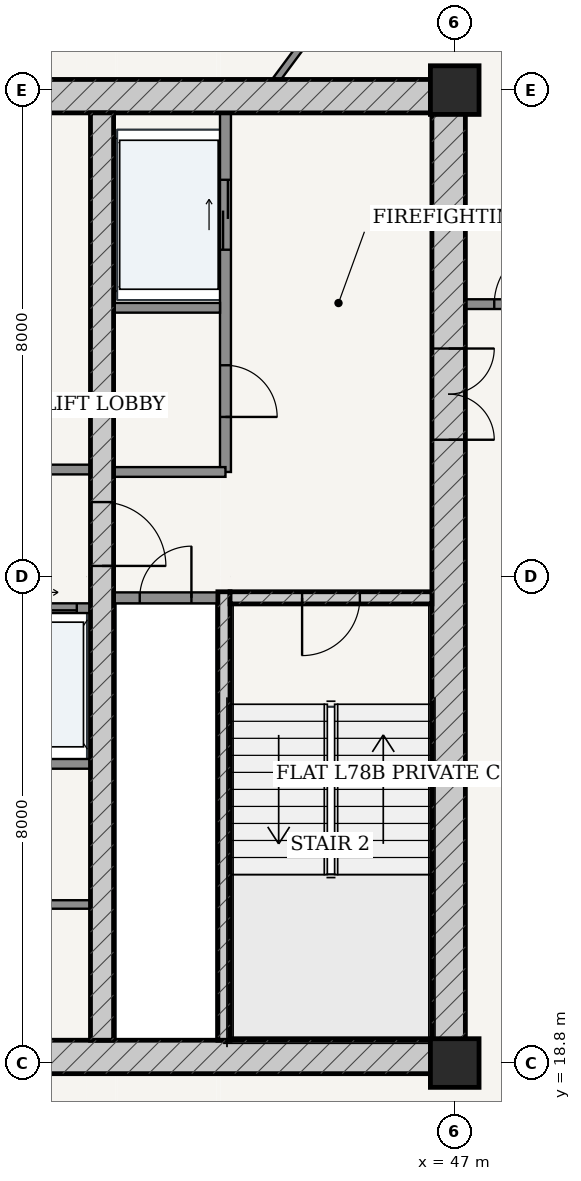
"""IFC4 building model, lengths in metres.
Left out: names, types, materials, properties, quantities, classifications, styles, units other than length and angle.
Written with IfcOpenShell. Run it as: python <this file> out.ifc"""

import sys

from ifc_helpers import new_model, si_unit, direction, frame, frame_2d, origin, origin_2d, place, context, subcontext, project, spatial, rectangle, extrude, source, transform, mapped, element, fill, save


model = new_model("IFC4")
c1 = context("Model", 3, precision=1e-05, world=origin(), true_north=direction((-0.2419218956, 0.970295726276)))
c2 = subcontext(c1, "Body", "Model", "MODEL_VIEW")
j1 = project(units=[si_unit("LENGTHUNIT", "METRE"), si_unit("PLANEANGLEUNIT", "RADIAN")], contexts=[c1])
p1 = place(None, origin())
s1 = spatial("IfcSite", under=j1, at=p1, CompositionType="ELEMENT")
p2 = place(p1, origin())
s2 = spatial("IfcBuilding", under=s1, at=p2, CompositionType="ELEMENT")
p3 = place(p2, frame((0.0, 0.0, 296.95)))
s3 = spatial("IfcBuildingStorey", under=s2, at=p3, CompositionType="ELEMENT", Elevation=296.95)
for number, where, z_axis, x_axis in (
    (1, (47.0, 18.8, 0.0), (0.0, 0.0, 1.0), (1.0, 0.0, 0.0)),
    (2, (47.0, 34.8, 0.0), (0.0, 0.0, 1.0), (1.0, 0.0, 0.0)),
):
    element("IfcColumn", number, at=place(p3, frame(where, z_axis=z_axis, x_axis=x_axis)), inside=s3, PredefinedType="COLUMN", context=c2, shape_type="SweptSolid", body=[
        extrude(rectangle(XDim=0.8, YDim=0.8, at=origin_2d()), origin(), (0.0, 0.0, 1.0), 3.75),
    ])
p4 = place(p3, frame((28.825, 18.9, 0.0), z_axis=(0.0, 0.0, 1.0), x_axis=(1.0, 0.0, 0.0)))
e3 = element("IfcWall", 3, at=p4, inside=s3, PredefinedType="SHEAR", context=c2, shape_type="SweptSolid", body=[
    extrude(rectangle(XDim=18.35, YDim=0.55, at=frame_2d((9.175, 0.0))), origin(), (0.0, 0.0, 1.0), 3.3),
])
p5 = place(p4, frame((8.75, 0.0, 0.0)))
e4 = element("IfcOpeningElement", 4, at=p5, cuts=e3, PredefinedType="OPENING", context=c2, shape_type="SweptSolid", body=[
    extrude(rectangle(XDim=0.85, YDim=2.1, at=frame_2d((0.425, 1.05))), frame((0.0, 0.285, 0.0), z_axis=(0.0, -1.0, 0.0), x_axis=(1.0, 0.0, 0.0)), (0.0, 0.0, 1.0), 0.57),
])
p6 = place(p3, frame((28.825, 34.7, 0.0), z_axis=(0.0, 0.0, 1.0), x_axis=(1.0, 0.0, 0.0)))
e5 = element("IfcWall", 5, at=p6, inside=s3, PredefinedType="SHEAR", context=c2, shape_type="SweptSolid", body=[
    extrude(rectangle(XDim=18.35, YDim=0.55, at=frame_2d((9.175, 0.0))), origin(), (0.0, 0.0, 1.0), 3.3),
])
p7 = place(p3, frame((46.9, 19.175, 0.0), z_axis=(0.0, 0.0, 1.0), x_axis=(0.0, 1.0, 0.0)))
e6 = element("IfcWall", 6, at=p7, inside=s3, PredefinedType="SHEAR", context=c2, shape_type="SweptSolid", body=[
    extrude(rectangle(XDim=15.25, YDim=0.55, at=frame_2d((7.625, 0.0))), origin(), (0.0, 0.0, 1.0), 3.3),
])
p8 = place(p7, frame((9.875, 0.0, 0.0)))
e7 = element("IfcOpeningElement", 7, at=p8, cuts=e6, PredefinedType="OPENING", context=c2, shape_type="SweptSolid", body=[
    extrude(rectangle(XDim=1.5, YDim=2.2, at=frame_2d((0.75, 1.1))), frame((0.0, 0.285, 0.0), z_axis=(0.0, -1.0, 0.0), x_axis=(1.0, 0.0, 0.0)), (0.0, 0.0, 1.0), 0.57),
])
p9 = place(p3, frame((43.205, 19.175, 0.0), z_axis=(0.0, 0.0, 1.0), x_axis=(0.0, 1.0, 0.0)))
e8 = element("IfcWall", 8, at=p9, inside=s3, PredefinedType="SOLIDWALL", context=c2, shape_type="SweptSolid", body=[
    extrude(rectangle(XDim=7.375, YDim=0.2, at=frame_2d((3.688, 0.0))), origin(), (0.0, 0.0, 1.0), 3.3),
])
p10 = place(p3, frame((43.305, 26.45, 0.0), z_axis=(0.0, 0.0, 1.0), x_axis=(1.0, 0.0, 0.0)))
e9 = element("IfcWall", 9, at=p10, inside=s3, PredefinedType="SOLIDWALL", context=c2, shape_type="SweptSolid", body=[
    extrude(rectangle(XDim=3.32, YDim=0.2, at=frame_2d((1.66, 0.0))), origin(), (0.0, 0.0, 1.0), 3.3),
])
p11 = place(p10, frame((1.185, 0.0, 0.0)))
e10 = element("IfcOpeningElement", 10, at=p11, cuts=e9, PredefinedType="OPENING", context=c2, shape_type="SweptSolid", body=[
    extrude(rectangle(XDim=0.95, YDim=2.15, at=frame_2d((0.475, 1.075))), frame((0.0, 0.11, 0.0), z_axis=(0.0, -1.0, 0.0), x_axis=(1.0, 0.0, 0.0)), (0.0, 0.0, 1.0), 0.22),
])
p12 = place(p3, frame((41.2, 19.175, 0.0), z_axis=(0.0, 0.0, 1.0), x_axis=(0.0, 1.0, 0.0)))
e11 = element("IfcWall", 11, at=p12, inside=s3, PredefinedType="SHEAR", context=c2, shape_type="SweptSolid", body=[
    extrude(rectangle(XDim=15.25, YDim=0.38, at=frame_2d((7.625, 0.0))), origin(), (0.0, 0.0, 1.0), 3.3),
])
p13 = place(p12, frame((7.8, 0.0, 0.0)))
e12 = element("IfcOpeningElement", 12, at=p13, cuts=e11, PredefinedType="OPENING", context=c2, shape_type="SweptSolid", body=[
    extrude(rectangle(XDim=1.05, YDim=2.15, at=frame_2d((0.525, 1.075))), frame((0.0, 0.2, 0.0), z_axis=(0.0, -1.0, 0.0), x_axis=(1.0, 0.0, 0.0)), (0.0, 0.0, 1.0), 0.4),
])
p14 = place(p3, frame((41.39, 26.45, 0.0), z_axis=(0.0, 0.0, 1.0), x_axis=(1.0, 0.0, 0.0)))
e13 = element("IfcWall", 13, at=p14, inside=s3, PredefinedType="PARTITIONING", context=c2, shape_type="SweptSolid", body=[
    extrude(rectangle(XDim=1.71, YDim=0.18, at=frame_2d((0.855, 0.0))), origin(), (0.0, 0.0, 1.0), 3.3),
])
p15 = place(p14, frame((0.43, 0.0, 0.0)))
e14 = element("IfcOpeningElement", 14, at=p15, cuts=e13, PredefinedType="OPENING", context=c2, shape_type="SweptSolid", body=[
    extrude(rectangle(XDim=0.85, YDim=2.1, at=frame_2d((0.425, 1.05))), frame((0.0, 0.1, 0.0), z_axis=(0.0, -1.0, 0.0), x_axis=(1.0, 0.0, 0.0)), (0.0, 0.0, 1.0), 0.2),
])
p16 = place(p3, frame((43.23, 28.52, 0.0), z_axis=(0.0, 0.0, 1.0), x_axis=(0.0, 1.0, 0.0)))
e15 = element("IfcWall", 15, at=p16, inside=s3, PredefinedType="PARTITIONING", context=c2, shape_type="SweptSolid", body=[
    extrude(rectangle(XDim=5.905, YDim=0.18, at=frame_2d((2.953, 0.0))), origin(), (0.0, 0.0, 1.0), 3.3),
])
p17 = place(p16, frame((0.905, 0.0, 0.0)))
e16 = element("IfcOpeningElement", 16, at=p17, cuts=e15, PredefinedType="OPENING", context=c2, shape_type="SweptSolid", body=[
    extrude(rectangle(XDim=0.85, YDim=2.1, at=frame_2d((0.425, 1.05))), frame((0.0, 0.1, 0.0), z_axis=(0.0, -1.0, 0.0), x_axis=(1.0, 0.0, 0.0)), (0.0, 0.0, 1.0), 0.2),
])
p18 = place(p16, frame((3.655, 0.0, 0.0)))
e17 = element("IfcOpeningElement", 17, at=p18, cuts=e15, PredefinedType="OPENING", context=c2, shape_type="SweptSolid", body=[
    extrude(rectangle(XDim=1.15, YDim=2.2, at=frame_2d((0.575, 1.1))), frame((0.0, 0.1, 0.0), z_axis=(0.0, -1.0, 0.0), x_axis=(1.0, 0.0, 0.0)), (0.0, 0.0, 1.0), 0.2),
])
p19 = place(p3, frame((41.39, 31.22, 0.0), z_axis=(0.0, 0.0, 1.0), x_axis=(1.0, 0.0, 0.0)))
e18 = element("IfcWall", 18, at=p19, inside=s3, PredefinedType="PARTITIONING", context=c2, shape_type="SweptSolid", body=[
    extrude(rectangle(XDim=1.75, YDim=0.16, at=frame_2d((0.875, 0.0))), origin(), (0.0, 0.0, 1.0), 3.3),
])
p20 = place(p3, frame((41.39, 28.52, 0.0), z_axis=(0.0, 0.0, 1.0), x_axis=(1.0, 0.0, 0.0)))
e19 = element("IfcWall", 19, at=p20, inside=s3, PredefinedType="PARTITIONING", context=c2, shape_type="SweptSolid", body=[
    extrude(rectangle(XDim=1.84, YDim=0.16, at=frame_2d((0.92, 0.0))), origin(), (0.0, 0.0, 1.0), 3.3),
])
p21 = place(p3, frame((34.99, 28.56, 0.0), z_axis=(0.0, 0.0, 1.0), x_axis=(1.0, 0.0, 0.0)))
e20 = element("IfcWall", 20, at=p21, inside=s3, PredefinedType="PARTITIONING", context=c2, shape_type="SweptSolid", body=[
    extrude(rectangle(XDim=6.02, YDim=0.16, at=frame_2d((3.01, 0.0))), origin(), (0.0, 0.0, 1.0), 3.3),
])
p22 = place(p21, frame((2.585, 0.0, 0.0)))
e21 = element("IfcOpeningElement", 21, at=p22, cuts=e20, PredefinedType="OPENING", context=c2, shape_type="SweptSolid", body=[
    extrude(rectangle(XDim=0.85, YDim=2.1, at=frame_2d((0.425, 1.05))), frame((0.0, 0.09, 0.0), z_axis=(0.0, -1.0, 0.0), x_axis=(1.0, 0.0, 0.0)), (0.0, 0.0, 1.0), 0.18),
])
p23 = place(p3, frame((34.99, 26.28, 0.0), z_axis=(0.0, 0.0, 1.0), x_axis=(1.0, 0.0, 0.0)))
e22 = element("IfcWall", 22, at=p23, inside=s3, PredefinedType="PARTITIONING", context=c2, shape_type="SweptSolid", body=[
    extrude(rectangle(XDim=6.02, YDim=0.16, at=frame_2d((3.01, 0.0))), origin(), (0.0, 0.0, 1.0), 3.3),
])
p24 = place(p23, frame((1.045, 0.0, 0.0)))
e23 = element("IfcOpeningElement", 23, at=p24, cuts=e22, PredefinedType="OPENING", context=c2, shape_type="SweptSolid", body=[
    extrude(rectangle(XDim=0.85, YDim=2.1, at=frame_2d((0.425, 1.05))), frame((0.0, 0.09, 0.0), z_axis=(0.0, -1.0, 0.0), x_axis=(1.0, 0.0, 0.0)), (0.0, 0.0, 1.0), 0.18),
])
p25 = place(p23, frame((3.215, 0.0, 0.0)))
e24 = element("IfcOpeningElement", 24, at=p25, cuts=e22, PredefinedType="OPENING", context=c2, shape_type="SweptSolid", body=[
    extrude(rectangle(XDim=1.1, YDim=2.2, at=frame_2d((0.55, 1.1))), frame((0.0, 0.09, 0.0), z_axis=(0.0, -1.0, 0.0), x_axis=(1.0, 0.0, 0.0)), (0.0, 0.0, 1.0), 0.18),
])
p26 = place(p23, frame((4.695, 0.0, 0.0)))
e25 = element("IfcOpeningElement", 25, at=p26, cuts=e22, PredefinedType="OPENING", context=c2, shape_type="SweptSolid", body=[
    extrude(rectangle(XDim=1.1, YDim=2.2, at=frame_2d((0.55, 1.1))), frame((0.0, 0.09, 0.0), z_axis=(0.0, -1.0, 0.0), x_axis=(1.0, 0.0, 0.0)), (0.0, 0.0, 1.0), 0.18),
])
p27 = place(p3, frame((34.99, 23.72, 0.0), z_axis=(0.0, 0.0, 1.0), x_axis=(1.0, 0.0, 0.0)))
e26 = element("IfcWall", 26, at=p27, inside=s3, PredefinedType="PARTITIONING", context=c2, shape_type="SweptSolid", body=[
    extrude(rectangle(XDim=6.02, YDim=0.16, at=frame_2d((3.01, 0.0))), origin(), (0.0, 0.0, 1.0), 3.3),
])
p28 = place(p3, frame((34.99, 21.407, 0.0), z_axis=(0.0, 0.0, 1.0), x_axis=(1.0, 0.0, 0.0)))
e27 = element("IfcWall", 27, at=p28, inside=s3, PredefinedType="PARTITIONING", context=c2, shape_type="SweptSolid", body=[
    extrude(rectangle(XDim=6.02, YDim=0.14, at=frame_2d((3.01, 0.0))), origin(), (0.0, 0.0, 1.0), 3.3),
])
p29 = place(p28, frame((2.585, 0.0, 0.0)))
e28 = element("IfcOpeningElement", 28, at=p29, cuts=e27, PredefinedType="OPENING", context=c2, shape_type="SweptSolid", body=[
    extrude(rectangle(XDim=0.85, YDim=2.1, at=frame_2d((0.425, 1.05))), frame((0.0, 0.08, 0.0), z_axis=(0.0, -1.0, 0.0), x_axis=(1.0, 0.0, 0.0)), (0.0, 0.0, 1.0), 0.16),
])
p30 = place(p3, frame((47.175, 31.28, 0.0), z_axis=(0.0, 0.0, 1.0), x_axis=(1.0, 0.0, 0.0)))
e29 = element("IfcWall", 29, at=p30, inside=s3, PredefinedType="PARTITIONING", context=c2, shape_type="SweptSolid", body=[
    extrude(rectangle(XDim=1.93, YDim=0.16, at=frame_2d((0.965, 0.0))), origin(), (0.0, 0.0, 1.0), 3.3),
])
p31 = place(p30, frame((0.475, 0.0, 0.0)))
e30 = element("IfcOpeningElement", 30, at=p31, cuts=e29, PredefinedType="OPENING", context=c2, shape_type="SweptSolid", body=[
    extrude(rectangle(XDim=0.98, YDim=2.2, at=frame_2d((0.49, 1.1))), frame((0.0, 0.09, 0.0), z_axis=(0.0, -1.0, 0.0), x_axis=(1.0, 0.0, 0.0)), (0.0, 0.0, 1.0), 0.18),
])
p32 = place(p3, frame((44.07, 34.977, 0.0), z_axis=(0.0, 0.0, 1.0), x_axis=(0.596034582173, 0.802958764106, 0.0)))
e31 = element("IfcWall", 31, at=p32, inside=s3, PredefinedType="PARTITIONING", context=c2, shape_type="SweptSolid", body=[
    extrude(rectangle(XDim=3.573, YDim=0.12, at=frame_2d((1.786, 0.0))), origin(), (0.0, 0.0, 1.0), 3.019),
])
p33 = place(p32, frame((1.336, 0.0, 0.0)))
e32 = element("IfcOpeningElement", 32, at=p33, cuts=e31, PredefinedType="OPENING", context=c2, shape_type="SweptSolid", body=[
    extrude(rectangle(XDim=0.9, YDim=2.15, at=frame_2d((0.45, 1.075))), frame((0.0, 0.07, 0.0), z_axis=(0.0, -1.0, 0.0), x_axis=(1.0, 0.0, 0.0)), (0.0, 0.0, 1.0), 0.14),
])
m1 = source(origin(), c2, "Body", "SweptSolid", [
    extrude(rectangle(XDim=1.5, YDim=2.2, at=frame_2d((0.75, 1.1))), frame((0.0, 0.025, 0.0), z_axis=(0.0, -1.0, 0.0), x_axis=(1.0, 0.0, 0.0)), (0.0, 0.0, 1.0), 0.05),
])
p34 = place(p8, frame((1.5, 0.0, 0.0), z_axis=(0.0, 0.0, 1.0), x_axis=(-1.0, 0.0, 0.0)))
e33 = element("IfcDoor", 33, at=p34, inside=s3, OperationType="DOUBLE_DOOR_SINGLE_SWING", PredefinedType="DOOR", context=c2, shape_type="MappedRepresentation", body=[
    mapped(m1, transform((0.0, 0.0, 0.0), scale=1.0)),
])
fill(e7, e33)
m2 = source(origin(), c2, "Body", "SweptSolid", [
    extrude(rectangle(XDim=1.05, YDim=2.15, at=frame_2d((0.525, 1.075))), frame((0.0, 0.025, 0.0), z_axis=(0.0, -1.0, 0.0), x_axis=(1.0, 0.0, 0.0)), (0.0, 0.0, 1.0), 0.05),
])
p35 = place(p13, frame((1.05, 0.0, 0.0), z_axis=(0.0, 0.0, 1.0), x_axis=(-1.0, 0.0, 0.0)))
e34 = element("IfcDoor", 34, at=p35, inside=s3, OperationType="SINGLE_SWING_RIGHT", PredefinedType="DOOR", context=c2, shape_type="MappedRepresentation", body=[
    mapped(m2, transform((0.0, 0.0, 0.0), scale=1.0)),
])
fill(e12, e34)
m3 = source(origin(), c2, "Body", "SweptSolid", [
    extrude(rectangle(XDim=0.95, YDim=2.15, at=frame_2d((0.475, 1.075))), frame((0.0, 0.025, 0.0), z_axis=(0.0, -1.0, 0.0), x_axis=(1.0, 0.0, 0.0)), (0.0, 0.0, 1.0), 0.05),
])
p36 = place(p11, frame((0.95, 0.0, 0.0), z_axis=(0.0, 0.0, 1.0), x_axis=(-1.0, 0.0, 0.0)))
e35 = element("IfcDoor", 35, at=p36, inside=s3, OperationType="SINGLE_SWING_RIGHT", PredefinedType="DOOR", context=c2, shape_type="MappedRepresentation", body=[
    mapped(m3, transform((0.0, 0.0, 0.0), scale=1.0)),
])
fill(e10, e35)
m4 = source(origin(), c2, "Body", "SweptSolid", [
    extrude(rectangle(XDim=0.85, YDim=2.1, at=frame_2d((0.425, 1.05))), frame((0.0, 0.025, 0.0), z_axis=(0.0, -1.0, 0.0), x_axis=(1.0, 0.0, 0.0)), (0.0, 0.0, 1.0), 0.05),
])
p37 = place(p15, origin())
e36 = element("IfcDoor", 36, at=p37, inside=s3, OperationType="SINGLE_SWING_RIGHT", PredefinedType="DOOR", context=c2, shape_type="MappedRepresentation", body=[
    mapped(m4, transform((0.0, 0.0, 0.0), scale=1.0)),
])
fill(e14, e36)
p38 = place(p17, frame((0.85, 0.0, 0.0), z_axis=(0.0, 0.0, 1.0), x_axis=(-1.0, 0.0, 0.0)))
e37 = element("IfcDoor", 37, at=p38, inside=s3, OperationType="SINGLE_SWING_RIGHT", PredefinedType="DOOR", context=c2, shape_type="MappedRepresentation", body=[
    mapped(m4, transform((0.0, 0.0, 0.0), scale=1.0)),
])
fill(e16, e37)
m5 = source(origin(), c2, "Body", "SweptSolid", [
    extrude(rectangle(XDim=1.15, YDim=2.2, at=frame_2d((0.575, 1.1))), frame((0.0, 0.025, 0.0), z_axis=(0.0, -1.0, 0.0), x_axis=(1.0, 0.0, 0.0)), (0.0, 0.0, 1.0), 0.05),
])
p39 = place(p18, origin())
e38 = element("IfcDoor", 38, at=p39, inside=s3, OperationType="DOUBLE_DOOR_SLIDING", PredefinedType="DOOR", context=c2, shape_type="MappedRepresentation", body=[
    mapped(m5, transform((0.0, 0.0, 0.0), scale=1.0)),
])
fill(e17, e38)
m6 = source(origin(), c2, "Body", "SweptSolid", [
    extrude(rectangle(XDim=1.1, YDim=2.2, at=frame_2d((0.55, 1.1))), frame((0.0, 0.025, 0.0), z_axis=(0.0, -1.0, 0.0), x_axis=(1.0, 0.0, 0.0)), (0.0, 0.0, 1.0), 0.05),
])
p40 = place(p26, origin())
e39 = element("IfcDoor", 39, at=p40, inside=s3, OperationType="DOUBLE_DOOR_SLIDING", PredefinedType="DOOR", context=c2, shape_type="MappedRepresentation", body=[
    mapped(m6, transform((0.0, 0.0, 0.0), scale=1.0)),
])
fill(e25, e39)
m7 = source(origin(), c2, "Body", "SweptSolid", [
    extrude(rectangle(XDim=0.98, YDim=2.2, at=frame_2d((0.49, 1.1))), frame((0.0, 0.025, 0.0), z_axis=(0.0, -1.0, 0.0), x_axis=(1.0, 0.0, 0.0)), (0.0, 0.0, 1.0), 0.05),
])
p41 = place(p31, origin())
e40 = element("IfcDoor", 40, at=p41, inside=s3, OperationType="SINGLE_SWING_RIGHT", PredefinedType="DOOR", context=c2, shape_type="MappedRepresentation", body=[
    mapped(m7, transform((0.0, 0.0, 0.0), scale=1.0)),
])
fill(e30, e40)
save(model, sys.argv[1])
